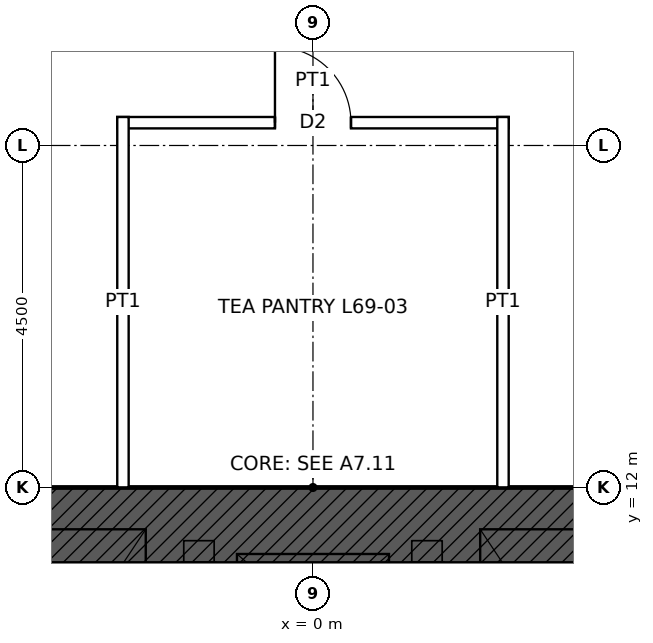
"""IFC4 building model, lengths in metres.
Left out: names, types, materials, properties, quantities, classifications, styles, units other than length and angle.
Written with IfcOpenShell. Run it as: python <this file> out.ifc"""

import sys

from ifc_helpers import new_model, si_unit, direction, frame, frame_2d, origin, place, context, subcontext, project, spatial, rectangle, extrude, element, fill, save


model = new_model("IFC4")
c1 = context("Model", 3, precision=1e-05, world=origin(), true_north=direction((0.0, 1.0)))
c2 = subcontext(c1, "Body", "Model", "MODEL_VIEW")
j1 = project(units=[si_unit("LENGTHUNIT", "METRE"), si_unit("PLANEANGLEUNIT", "RADIAN")], contexts=[c1])
p1 = place(None, origin())
s1 = spatial("IfcSite", under=j1, at=p1, CompositionType="ELEMENT")
p2 = place(p1, origin())
s2 = spatial("IfcBuilding", under=s1, at=p2, CompositionType="ELEMENT")
p3 = place(p2, frame((0.0, 0.0, 311.9)))
s3 = spatial("IfcBuildingStorey", under=s2, at=p3, CompositionType="ELEMENT", Elevation=311.9)
p4 = place(p3, frame((-12.0, 11.5, 0.0), z_axis=(0.0, 0.0, 1.0), x_axis=(1.0, 0.0, 0.0)))
e1 = element("IfcWall", 1, at=p4, inside=s3, PredefinedType="SHEAR", context=c2, shape_type="SweptSolid", body=[
    extrude(rectangle(XDim=24.0, YDim=1.0, at=frame_2d((12.0, 0.0))), origin(), (0.0, 0.0, 1.0), 4.0),
])
p5 = place(p4, frame((6.25, 0.0, 0.0)))
e2 = element("IfcOpeningElement", 2, at=p5, cuts=e1, PredefinedType="OPENING", context=c2, shape_type="SweptSolid", body=[
    extrude(rectangle(XDim=1.0, YDim=2.4, at=frame_2d((0.5, 1.2))), frame((0.0, 0.51, 0.0), z_axis=(0.0, -1.0, 0.0), x_axis=(1.0, 0.0, 0.0)), (0.0, 0.0, 1.0), 1.02),
])
p6 = place(p4, frame((16.75, 0.0, 0.0)))
e3 = element("IfcOpeningElement", 3, at=p6, cuts=e1, PredefinedType="OPENING", context=c2, shape_type="SweptSolid", body=[
    extrude(rectangle(XDim=1.0, YDim=2.4, at=frame_2d((0.5, 1.2))), frame((0.0, 0.51, 0.0), z_axis=(0.0, -1.0, 0.0), x_axis=(1.0, 0.0, 0.0)), (0.0, 0.0, 1.0), 1.02),
])
p7 = place(p3, frame((-2.575, 16.8, 0.0), z_axis=(0.0, 0.0, 1.0), x_axis=(1.0, 0.0, 0.0)))
e4 = element("IfcWall", 4, at=p7, inside=s3, PredefinedType="PARTITIONING", context=c2, shape_type="SweptSolid", body=[
    extrude(rectangle(XDim=5.15, YDim=0.15, at=frame_2d((2.575, 0.0))), origin(), (0.0, 0.0, 1.0), 3.85),
])
p8 = place(p7, frame((2.075, 0.0, 0.0)))
e5 = element("IfcOpeningElement", 5, at=p8, cuts=e4, PredefinedType="OPENING", context=c2, shape_type="SweptSolid", body=[
    extrude(rectangle(XDim=1.0, YDim=2.1, at=frame_2d((0.5, 1.05))), frame((0.0, 0.085, 0.0), z_axis=(0.0, -1.0, 0.0), x_axis=(1.0, 0.0, 0.0)), (0.0, 0.0, 1.0), 0.17),
])
for number, where, z_axis, x_axis in (
    (6, (-2.5, 12.0, 0.0), (0.0, 0.0, 1.0), (0.0, 1.0, 0.0)),
    (7, (2.5, 12.0, 0.0), (0.0, 0.0, 1.0), (0.0, 1.0, 0.0)),
):
    element("IfcWall", number, at=place(p3, frame(where, z_axis=z_axis, x_axis=x_axis)), inside=s3, PredefinedType="PARTITIONING", context=c2, shape_type="SweptSolid", body=[
        extrude(rectangle(XDim=4.875, YDim=0.15, at=frame_2d((2.438, 0.0))), origin(), (0.0, 0.0, 1.0), 3.85),
    ])
p9 = place(p8, origin())
e8 = element("IfcDoor", 8, at=p9, inside=s3, OperationType="SINGLE_SWING_LEFT", PredefinedType="DOOR", context=c2, shape_type="SweptSolid", body=[
    extrude(rectangle(XDim=1.0, YDim=2.1, at=frame_2d((0.5, 1.05))), frame((0.0, 0.025, 0.0), z_axis=(0.0, -1.0, 0.0), x_axis=(1.0, 0.0, 0.0)), (0.0, 0.0, 1.0), 0.05),
])
fill(e5, e8)
save(model, sys.argv[1])
